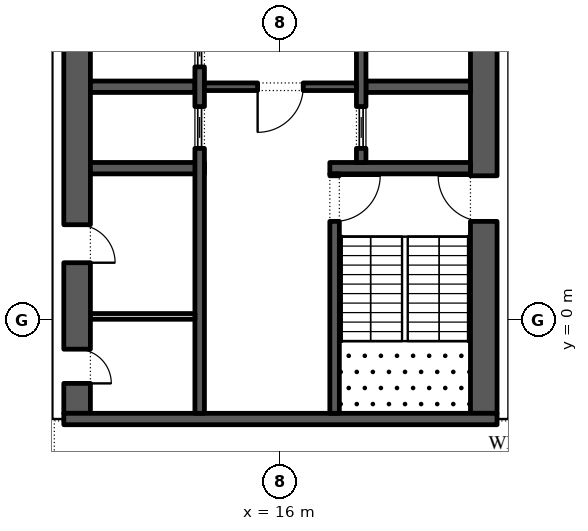
"""IFC4 building model, lengths in metres.
Left out: names, types, materials, properties, quantities, classifications, styles, units other than length and angle.
Written with IfcOpenShell. Run it as: python <this file> out.ifc"""

import sys

from ifc_helpers import new_model, si_unit, direction, frame, frame_2d, origin, place, context, subcontext, project, spatial, rectangle, extrude, element, fill, save


model = new_model("IFC4")
c1 = context("Model", 3, precision=1e-05, world=origin(), true_north=direction((0.0, 1.0)))
c2 = subcontext(c1, "Body", "Model", "MODEL_VIEW")
j1 = project(units=[si_unit("LENGTHUNIT", "METRE"), si_unit("PLANEANGLEUNIT", "RADIAN")], contexts=[c1])
p1 = place(None, origin())
s1 = spatial("IfcSite", under=j1, at=p1, CompositionType="ELEMENT")
p2 = place(p1, origin())
s2 = spatial("IfcBuilding", under=s1, at=p2, CompositionType="ELEMENT")
p3 = place(p2, frame((0.0, 0.0, 175.8)))
s3 = spatial("IfcBuildingStorey", under=s2, at=p3, CompositionType="ELEMENT", Elevation=175.8)
p4 = place(p3, frame((33.157, -5.092, 0.0), z_axis=(0.0, 0.0, 1.0), x_axis=(-0.224950279389, 0.974370243697, 0.0)))
e1 = element("IfcWall", 1, at=p4, inside=s3, PredefinedType="STANDARD", context=c2, shape_type="SweptSolid", body=[
    extrude(rectangle(XDim=49.5, YDim=0.3, at=frame_2d((24.75, 0.0))), origin(), (0.0, 0.0, 1.0), 4.0),
])
p5 = place(p4, frame((2.207, 0.0, 0.0)))
e2 = element("IfcOpeningElement", 2, at=p5, cuts=e1, PredefinedType="OPENING", context=c2, shape_type="SweptSolid", body=[
    extrude(rectangle(XDim=2.4, YDim=3.125, at=frame_2d((1.2, 1.562))), frame((0.0, 0.16, 0.0), z_axis=(0.0, -1.0, 0.0), x_axis=(1.0, 0.0, 0.0)), (0.0, 0.0, 1.0), 0.32),
])
p6 = place(p4, frame((8.121, 0.0, 0.45)))
e3 = element("IfcOpeningElement", 3, at=p6, cuts=e1, PredefinedType="OPENING", context=c2, shape_type="SweptSolid", body=[
    extrude(rectangle(XDim=4.5, YDim=2.875, at=frame_2d((2.25, 1.438))), frame((0.0, 0.16, 0.0), z_axis=(0.0, -1.0, 0.0), x_axis=(1.0, 0.0, 0.0)), (0.0, 0.0, 1.0), 0.32),
])
p7 = place(p4, frame((15.236, 0.0, 0.45)))
e4 = element("IfcOpeningElement", 4, at=p7, cuts=e1, PredefinedType="OPENING", context=c2, shape_type="SweptSolid", body=[
    extrude(rectangle(XDim=4.5, YDim=2.875, at=frame_2d((2.25, 1.438))), frame((0.0, 0.16, 0.0), z_axis=(0.0, -1.0, 0.0), x_axis=(1.0, 0.0, 0.0)), (0.0, 0.0, 1.0), 0.32),
])
p8 = place(p4, frame((22.35, 0.0, 0.45)))
e5 = element("IfcOpeningElement", 5, at=p8, cuts=e1, PredefinedType="OPENING", context=c2, shape_type="SweptSolid", body=[
    extrude(rectangle(XDim=4.5, YDim=3.0, at=frame_2d((2.25, 1.5))), frame((0.0, 0.16, 0.0), z_axis=(0.0, -1.0, 0.0), x_axis=(1.0, 0.0, 0.0)), (0.0, 0.0, 1.0), 0.32),
])
p9 = place(p4, frame((30.514, 0.0, 0.0)))
e6 = element("IfcOpeningElement", 6, at=p9, cuts=e1, PredefinedType="OPENING", context=c2, shape_type="SweptSolid", body=[
    extrude(rectangle(XDim=2.4, YDim=3.45, at=frame_2d((1.2, 1.725))), frame((0.0, 0.16, 0.0), z_axis=(0.0, -1.0, 0.0), x_axis=(1.0, 0.0, 0.0)), (0.0, 0.0, 1.0), 0.32),
])
p10 = place(p4, frame((36.579, 0.0, 0.45)))
e7 = element("IfcOpeningElement", 7, at=p10, cuts=e1, PredefinedType="OPENING", context=c2, shape_type="SweptSolid", body=[
    extrude(rectangle(XDim=4.5, YDim=3.05, at=frame_2d((2.25, 1.525))), frame((0.0, 0.16, 0.0), z_axis=(0.0, -1.0, 0.0), x_axis=(1.0, 0.0, 0.0)), (0.0, 0.0, 1.0), 0.32),
])
p11 = place(p4, frame((43.693, 0.0, 0.45)))
e8 = element("IfcOpeningElement", 8, at=p11, cuts=e1, PredefinedType="OPENING", context=c2, shape_type="SweptSolid", body=[
    extrude(rectangle(XDim=4.5, YDim=3.05, at=frame_2d((2.25, 1.525))), frame((0.0, 0.16, 0.0), z_axis=(0.0, -1.0, 0.0), x_axis=(1.0, 0.0, 0.0)), (0.0, 0.0, 1.0), 0.32),
])
p12 = place(p3, frame((21.35, -2.45, 0.0), z_axis=(0.0, 0.0, 1.0), x_axis=(0.0, 1.0, 0.0)))
e9 = element("IfcWall", 9, at=p12, inside=s3, PredefinedType="SHEAR", context=c2, shape_type="SweptSolid", body=[
    extrude(rectangle(XDim=27.9, YDim=0.7, at=frame_2d((13.95, 0.0))), origin(), (0.0, 0.0, 1.0), 4.0),
])
p13 = place(p12, frame((5.05, 0.0, 0.0)))
e10 = element("IfcOpeningElement", 10, at=p13, cuts=e9, PredefinedType="OPENING", context=c2, shape_type="SweptSolid", body=[
    extrude(rectangle(XDim=1.2, YDim=2.1, at=frame_2d((0.6, 1.05))), frame((0.0, 0.36, 0.0), z_axis=(0.0, -1.0, 0.0), x_axis=(1.0, 0.0, 0.0)), (0.0, 0.0, 1.0), 0.72),
])
p14 = place(p12, frame((21.65, 0.0, 0.0)))
e11 = element("IfcOpeningElement", 11, at=p14, cuts=e9, PredefinedType="OPENING", context=c2, shape_type="SweptSolid", body=[
    extrude(rectangle(XDim=1.2, YDim=2.1, at=frame_2d((0.6, 1.05))), frame((0.0, 0.36, 0.0), z_axis=(0.0, -1.0, 0.0), x_axis=(1.0, 0.0, 0.0)), (0.0, 0.0, 1.0), 0.72),
])
p15 = place(p3, frame((10.65, -2.45, 0.0), z_axis=(0.0, 0.0, 1.0), x_axis=(0.0, 1.0, 0.0)))
e12 = element("IfcWall", 12, at=p15, inside=s3, PredefinedType="SHEAR", context=c2, shape_type="SweptSolid", body=[
    extrude(rectangle(XDim=27.9, YDim=0.7, at=frame_2d((13.95, 0.0))), origin(), (0.0, 0.0, 1.0), 4.0),
])
p16 = place(p15, frame((23.65, 0.0, 0.0)))
e13 = element("IfcOpeningElement", 13, at=p16, cuts=e12, PredefinedType="OPENING", context=c2, shape_type="SweptSolid", body=[
    extrude(rectangle(XDim=2.4, YDim=2.1, at=frame_2d((1.2, 1.05))), frame((0.0, 0.36, 0.0), z_axis=(0.0, -1.0, 0.0), x_axis=(1.0, 0.0, 0.0)), (0.0, 0.0, 1.0), 0.72),
])
p17 = place(p15, frame((0.788, 0.0, 0.0)))
e14 = element("IfcOpeningElement", 14, at=p17, cuts=e12, PredefinedType="OPENING", context=c2, shape_type="SweptSolid", body=[
    extrude(rectangle(XDim=0.9, YDim=2.1, at=frame_2d((0.45, 1.05))), frame((0.0, 0.36, 0.0), z_axis=(0.0, -1.0, 0.0), x_axis=(1.0, 0.0, 0.0)), (0.0, 0.0, 1.0), 0.72),
])
p18 = place(p15, frame((3.962, 0.0, 0.0)))
e15 = element("IfcOpeningElement", 15, at=p18, cuts=e12, PredefinedType="OPENING", context=c2, shape_type="SweptSolid", body=[
    extrude(rectangle(XDim=1.0, YDim=2.1, at=frame_2d((0.5, 1.05))), frame((0.0, 0.36, 0.0), z_axis=(0.0, -1.0, 0.0), x_axis=(1.0, 0.0, 0.0)), (0.0, 0.0, 1.0), 0.72),
])
p19 = place(p3, frame((10.3, -2.6, 0.0), z_axis=(0.0, 0.0, 1.0), x_axis=(1.0, 0.0, 0.0)))
e16 = element("IfcWall", 16, at=p19, inside=s3, PredefinedType="SHEAR", context=c2, shape_type="SweptSolid", body=[
    extrude(rectangle(XDim=11.4, YDim=0.3, at=frame_2d((5.7, 0.0))), origin(), (0.0, 0.0, 1.0), 4.0),
])
p20 = place(p3, frame((17.3, 4.0, 0.0), z_axis=(0.0, 0.0, 1.0), x_axis=(1.0, 0.0, 0.0)))
e17 = element("IfcWall", 17, at=p20, inside=s3, PredefinedType="SHEAR", context=c2, shape_type="SweptSolid", body=[
    extrude(rectangle(XDim=3.7, YDim=0.3, at=frame_2d((1.85, 0.0))), origin(), (0.0, 0.0, 1.0), 4.0),
])
p21 = place(p3, frame((17.425, -2.45, 0.0), z_axis=(0.0, 0.0, 1.0), x_axis=(0.0, 1.0, 0.0)))
e18 = element("IfcWall", 18, at=p21, inside=s3, PredefinedType="SHEAR", context=c2, shape_type="SweptSolid", body=[
    extrude(rectangle(XDim=6.3, YDim=0.25, at=frame_2d((3.15, 0.0))), origin(), (0.0, 0.0, 1.0), 4.0),
])
p22 = place(p21, frame((5.05, 0.0, 0.0)))
e19 = element("IfcOpeningElement", 19, at=p22, cuts=e18, PredefinedType="OPENING", context=c2, shape_type="SweptSolid", body=[
    extrude(rectangle(XDim=1.2, YDim=2.1, at=frame_2d((0.6, 1.05))), frame((0.0, 0.135, 0.0), z_axis=(0.0, -1.0, 0.0), x_axis=(1.0, 0.0, 0.0)), (0.0, 0.0, 1.0), 0.27),
])
p23 = place(p3, frame((18.25, 6.143, 0.0), z_axis=(0.0, 0.0, 1.0), x_axis=(1.0, 0.0, 0.0)))
e20 = element("IfcWall", 20, at=p23, inside=s3, PredefinedType="SHEAR", context=c2, shape_type="SweptSolid", body=[
    extrude(rectangle(XDim=2.75, YDim=0.3, at=frame_2d((1.375, 0.0))), origin(), (0.0, 0.0, 1.0), 4.0),
])
p24 = place(p3, frame((18.125, 4.15, 0.0), z_axis=(0.0, 0.0, 1.0), x_axis=(0.0, 1.0, 0.0)))
e21 = element("IfcWall", 21, at=p24, inside=s3, PredefinedType="SHEAR", context=c2, shape_type="SweptSolid", body=[
    extrude(rectangle(XDim=14.7, YDim=0.25, at=frame_2d((7.35, 0.0))), origin(), (0.0, 0.0, 1.0), 4.0),
])
p25 = place(p24, frame((4.296, 0.0, 0.0)))
e22 = element("IfcOpeningElement", 22, at=p25, cuts=e21, PredefinedType="OPENING", context=c2, shape_type="SweptSolid", body=[
    extrude(rectangle(XDim=0.9, YDim=2.1, at=frame_2d((0.45, 1.05))), frame((0.0, 0.135, 0.0), z_axis=(0.0, -1.0, 0.0), x_axis=(1.0, 0.0, 0.0)), (0.0, 0.0, 1.0), 0.27),
])
p26 = place(p24, frame((9.504, 0.0, 0.0)))
e23 = element("IfcOpeningElement", 23, at=p26, cuts=e21, PredefinedType="OPENING", context=c2, shape_type="SweptSolid", body=[
    extrude(rectangle(XDim=0.9, YDim=2.1, at=frame_2d((0.45, 1.05))), frame((0.0, 0.135, 0.0), z_axis=(0.0, -1.0, 0.0), x_axis=(1.0, 0.0, 0.0)), (0.0, 0.0, 1.0), 0.27),
])
p27 = place(p24, frame((0.371, 0.0, 0.0)))
e24 = element("IfcOpeningElement", 24, at=p27, cuts=e21, PredefinedType="OPENING", context=c2, shape_type="SweptSolid", body=[
    extrude(rectangle(XDim=1.1, YDim=2.1, at=frame_2d((0.55, 1.05))), frame((0.0, 0.135, 0.0), z_axis=(0.0, -1.0, 0.0), x_axis=(1.0, 0.0, 0.0)), (0.0, 0.0, 1.0), 0.27),
])
p28 = place(p24, frame((13.229, 0.0, 0.0)))
e25 = element("IfcOpeningElement", 25, at=p28, cuts=e21, PredefinedType="OPENING", context=c2, shape_type="SweptSolid", body=[
    extrude(rectangle(XDim=1.1, YDim=2.1, at=frame_2d((0.55, 1.05))), frame((0.0, 0.135, 0.0), z_axis=(0.0, -1.0, 0.0), x_axis=(1.0, 0.0, 0.0)), (0.0, 0.0, 1.0), 0.27),
])
p29 = place(p3, frame((11.0, 4.0, 0.0), z_axis=(0.0, 0.0, 1.0), x_axis=(1.0, 0.0, 0.0)))
e26 = element("IfcWall", 26, at=p29, inside=s3, PredefinedType="SHEAR", context=c2, shape_type="SweptSolid", body=[
    extrude(rectangle(XDim=3.0, YDim=0.3, at=frame_2d((1.5, 0.0))), origin(), (0.0, 0.0, 1.0), 4.0),
])
p30 = place(p3, frame((11.0, 6.143, 0.0), z_axis=(0.0, 0.0, 1.0), x_axis=(1.0, 0.0, 0.0)))
e27 = element("IfcWall", 27, at=p30, inside=s3, PredefinedType="SHEAR", context=c2, shape_type="SweptSolid", body=[
    extrude(rectangle(XDim=2.75, YDim=0.3, at=frame_2d((1.375, 0.0))), origin(), (0.0, 0.0, 1.0), 4.0),
])
p31 = place(p3, frame((13.875, -2.45, 0.0), z_axis=(0.0, 0.0, 1.0), x_axis=(0.0, 1.0, 0.0)))
e28 = element("IfcWall", 28, at=p31, inside=s3, PredefinedType="SHEAR", context=c2, shape_type="SweptSolid", body=[
    extrude(rectangle(XDim=21.3, YDim=0.25, at=frame_2d((10.65, 0.0))), origin(), (0.0, 0.0, 1.0), 4.0),
])
p32 = place(p31, frame((17.786, 0.0, 0.0)))
e29 = element("IfcOpeningElement", 29, at=p32, cuts=e28, PredefinedType="OPENING", context=c2, shape_type="SweptSolid", body=[
    extrude(rectangle(XDim=0.9, YDim=2.1, at=frame_2d((0.45, 1.05))), frame((0.0, 0.135, 0.0), z_axis=(0.0, -1.0, 0.0), x_axis=(1.0, 0.0, 0.0)), (0.0, 0.0, 1.0), 0.27),
])
p33 = place(p31, frame((6.971, 0.0, 0.0)))
e30 = element("IfcOpeningElement", 30, at=p33, cuts=e28, PredefinedType="OPENING", context=c2, shape_type="SweptSolid", body=[
    extrude(rectangle(XDim=1.1, YDim=2.1, at=frame_2d((0.55, 1.05))), frame((0.0, 0.135, 0.0), z_axis=(0.0, -1.0, 0.0), x_axis=(1.0, 0.0, 0.0)), (0.0, 0.0, 1.0), 0.27),
])
p34 = place(p31, frame((9.114, 0.0, 0.0)))
e31 = element("IfcOpeningElement", 31, at=p34, cuts=e28, PredefinedType="OPENING", context=c2, shape_type="SweptSolid", body=[
    extrude(rectangle(XDim=1.1, YDim=2.1, at=frame_2d((0.55, 1.05))), frame((0.0, 0.135, 0.0), z_axis=(0.0, -1.0, 0.0), x_axis=(1.0, 0.0, 0.0)), (0.0, 0.0, 1.0), 0.27),
])
p35 = place(p31, frame((11.257, 0.0, 0.0)))
e32 = element("IfcOpeningElement", 32, at=p35, cuts=e28, PredefinedType="OPENING", context=c2, shape_type="SweptSolid", body=[
    extrude(rectangle(XDim=1.1, YDim=2.1, at=frame_2d((0.55, 1.05))), frame((0.0, 0.135, 0.0), z_axis=(0.0, -1.0, 0.0), x_axis=(1.0, 0.0, 0.0)), (0.0, 0.0, 1.0), 0.27),
])
p36 = place(p31, frame((13.4, 0.0, 0.0)))
e33 = element("IfcOpeningElement", 33, at=p36, cuts=e28, PredefinedType="OPENING", context=c2, shape_type="SweptSolid", body=[
    extrude(rectangle(XDim=1.1, YDim=2.1, at=frame_2d((0.55, 1.05))), frame((0.0, 0.135, 0.0), z_axis=(0.0, -1.0, 0.0), x_axis=(1.0, 0.0, 0.0)), (0.0, 0.0, 1.0), 0.27),
])
p37 = place(p3, frame((14.0, 6.143, 0.0), z_axis=(0.0, 0.0, 1.0), x_axis=(1.0, 0.0, 0.0)))
e34 = element("IfcWall", 34, at=p37, inside=s3, PredefinedType="SHEAR", context=c2, shape_type="SweptSolid", body=[
    extrude(rectangle(XDim=4.0, YDim=0.2, at=frame_2d((2.0, 0.0))), origin(), (0.0, 0.0, 1.0), 4.0),
])
p38 = place(p37, frame((1.4, 0.0, 0.0)))
e35 = element("IfcOpeningElement", 35, at=p38, cuts=e34, PredefinedType="OPENING", context=c2, shape_type="SweptSolid", body=[
    extrude(rectangle(XDim=1.2, YDim=2.1, at=frame_2d((0.6, 1.05))), frame((0.0, 0.11, 0.0), z_axis=(0.0, -1.0, 0.0), x_axis=(1.0, 0.0, 0.0)), (0.0, 0.0, 1.0), 0.22),
])
p39 = place(p3, frame((11.0, 0.1, 0.0), z_axis=(0.0, 0.0, 1.0), x_axis=(1.0, 0.0, 0.0)))
e36 = element("IfcWall", 36, at=p39, inside=s3, PredefinedType="PARTITIONING", context=c2, shape_type="SweptSolid", body=[
    extrude(rectangle(XDim=2.75, YDim=0.15, at=frame_2d((1.375, 0.0))), origin(), (0.0, 0.0, 1.0), 4.0),
])
p40 = place(p27, origin())
e37 = element("IfcDoor", 37, at=p40, inside=s3, OperationType="SLIDING_TO_LEFT", PredefinedType="DOOR", context=c2, shape_type="SweptSolid", body=[
    extrude(rectangle(XDim=1.1, YDim=2.1, at=frame_2d((0.55, 1.05))), frame((0.0, 0.025, 0.0), z_axis=(0.0, -1.0, 0.0), x_axis=(1.0, 0.0, 0.0)), (0.0, 0.0, 1.0), 0.05),
])
fill(e24, e37)
p41 = place(p33, origin())
e38 = element("IfcDoor", 38, at=p41, inside=s3, OperationType="SLIDING_TO_LEFT", PredefinedType="DOOR", context=c2, shape_type="SweptSolid", body=[
    extrude(rectangle(XDim=1.1, YDim=2.1, at=frame_2d((0.55, 1.05))), frame((0.0, 0.025, 0.0), z_axis=(0.0, -1.0, 0.0), x_axis=(1.0, 0.0, 0.0)), (0.0, 0.0, 1.0), 0.05),
])
fill(e30, e38)
p42 = place(p34, origin())
e39 = element("IfcDoor", 39, at=p42, inside=s3, OperationType="SLIDING_TO_LEFT", PredefinedType="DOOR", context=c2, shape_type="SweptSolid", body=[
    extrude(rectangle(XDim=1.1, YDim=2.1, at=frame_2d((0.55, 1.05))), frame((0.0, 0.025, 0.0), z_axis=(0.0, -1.0, 0.0), x_axis=(1.0, 0.0, 0.0)), (0.0, 0.0, 1.0), 0.05),
])
fill(e31, e39)
p43 = place(p38, frame((1.2, 0.0, 0.0), z_axis=(0.0, 0.0, 1.0), x_axis=(-1.0, 0.0, 0.0)))
e40 = element("IfcDoor", 40, at=p43, inside=s3, OperationType="SINGLE_SWING_LEFT", PredefinedType="DOOR", context=c2, shape_type="SweptSolid", body=[
    extrude(rectangle(XDim=1.2, YDim=2.1, at=frame_2d((0.6, 1.05))), frame((0.0, 0.025, 0.0), z_axis=(0.0, -1.0, 0.0), x_axis=(1.0, 0.0, 0.0)), (0.0, 0.0, 1.0), 0.05),
])
fill(e35, e40)
p44 = place(p22, frame((1.2, 0.0, 0.0), z_axis=(0.0, 0.0, 1.0), x_axis=(-1.0, 0.0, 0.0)))
e41 = element("IfcDoor", 41, at=p44, inside=s3, OperationType="SINGLE_SWING_RIGHT", PredefinedType="DOOR", context=c2, shape_type="SweptSolid", body=[
    extrude(rectangle(XDim=1.2, YDim=2.1, at=frame_2d((0.6, 1.05))), frame((0.0, 0.025, 0.0), z_axis=(0.0, -1.0, 0.0), x_axis=(1.0, 0.0, 0.0)), (0.0, 0.0, 1.0), 0.05),
])
fill(e19, e41)
p45 = place(p13, origin())
e42 = element("IfcDoor", 42, at=p45, inside=s3, OperationType="SINGLE_SWING_LEFT", PredefinedType="DOOR", context=c2, shape_type="SweptSolid", body=[
    extrude(rectangle(XDim=1.2, YDim=2.1, at=frame_2d((0.6, 1.05))), frame((0.0, 0.025, 0.0), z_axis=(0.0, -1.0, 0.0), x_axis=(1.0, 0.0, 0.0)), (0.0, 0.0, 1.0), 0.05),
])
fill(e10, e42)
p46 = place(p17, frame((0.9, -0.65, 0.0), z_axis=(0.0, 0.0, 1.0), x_axis=(-1.0, 0.0, 0.0)))
e43 = element("IfcDoor", 43, at=p46, inside=s3, OperationType="SINGLE_SWING_LEFT", PredefinedType="DOOR", context=c2, shape_type="SweptSolid", body=[
    extrude(rectangle(XDim=0.9, YDim=2.1, at=frame_2d((0.45, 1.05))), frame((0.0, -0.3, 0.0), z_axis=(0.0, -1.0, 0.0), x_axis=(1.0, 0.0, 0.0)), (0.0, 0.0, 1.0), 0.05),
])
fill(e14, e43)
p47 = place(p18, frame((1.0, -0.65, 0.0), z_axis=(0.0, 0.0, 1.0), x_axis=(-1.0, 0.0, 0.0)))
e44 = element("IfcDoor", 44, at=p47, inside=s3, OperationType="SINGLE_SWING_LEFT", PredefinedType="DOOR", context=c2, shape_type="SweptSolid", body=[
    extrude(rectangle(XDim=1.0, YDim=2.1, at=frame_2d((0.5, 1.05))), frame((0.0, -0.3, 0.0), z_axis=(0.0, -1.0, 0.0), x_axis=(1.0, 0.0, 0.0)), (0.0, 0.0, 1.0), 0.05),
])
fill(e15, e44)
save(model, sys.argv[1])
